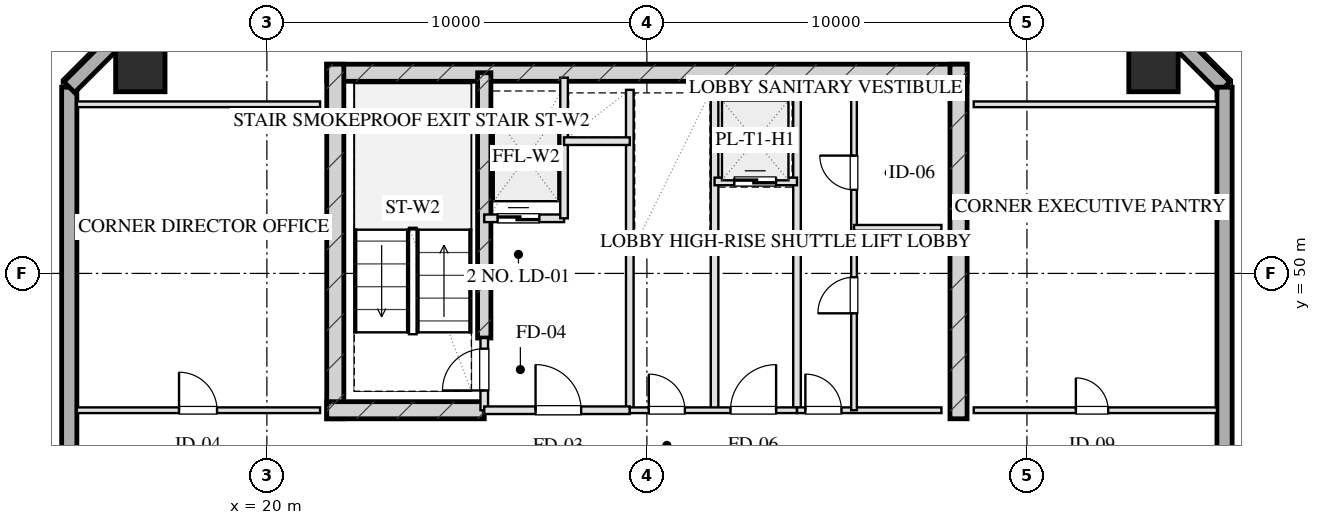
"""IFC4 building model, lengths in metres.
Left out: names, types, materials, properties, quantities, classifications, styles, units other than length and angle.
Written with IfcOpenShell. Run it as: python <this file> out.ifc"""

import sys

from ifc_helpers import new_model, si_unit, direction, frame, frame_2d, origin, origin_2d, place, context, subcontext, project, spatial, rectangle, hollow_rectangle, extrude, element, fill, save


model = new_model("IFC4")
c1 = context("Model", 3, precision=1e-05, world=origin(), true_north=direction((0.0, 1.0)))
c2 = subcontext(c1, "Body", "Model", "MODEL_VIEW")
j1 = project(units=[si_unit("LENGTHUNIT", "METRE"), si_unit("PLANEANGLEUNIT", "RADIAN")], contexts=[c1])
p1 = place(None, origin())
s1 = spatial("IfcSite", under=j1, at=p1, CompositionType="ELEMENT")
p2 = place(p1, origin())
s2 = spatial("IfcBuilding", under=s1, at=p2, CompositionType="ELEMENT")
p3 = place(p2, frame((0.0, 0.0, 226.55)))
s3 = spatial("IfcBuildingStorey", under=s2, at=p3, CompositionType="ELEMENT", Elevation=226.55)
p4 = place(p3, frame((21.575, 55.28, 0.0), z_axis=(0.0, 0.0, 1.0), x_axis=(1.0, 0.0, 0.0)))
e1 = element("IfcWall", 1, at=p4, inside=s3, PredefinedType="SHEAR", context=c2, shape_type="SweptSolid", body=[
    extrude(rectangle(XDim=16.85, YDim=0.45, at=frame_2d((8.425, 0.0))), origin(), (0.0, 0.0, 1.0), 3.45),
])
for number, where, z_axis, x_axis in (
    (2, (21.8, 46.175, 0.0), (0.0, 0.0, 1.0), (0.0, 1.0, 0.0)),
    (3, (38.2, 46.175, 0.0), (0.0, 0.0, 1.0), (0.0, 1.0, 0.0)),
):
    element("IfcWall", number, at=place(p3, frame(where, z_axis=z_axis, x_axis=x_axis)), inside=s3, PredefinedType="SHEAR", context=c2, shape_type="SweptSolid", body=[
        extrude(rectangle(XDim=9.33, YDim=0.45, at=frame_2d((4.665, 0.0))), origin(), (0.0, 0.0, 1.0), 3.45),
    ])
p5 = place(p3, frame((25.72, 48.3, 0.0), z_axis=(0.0, 0.0, 1.0), x_axis=(0.0, 1.0, 0.0)))
e4 = element("IfcWall", 4, at=p5, inside=s3, PredefinedType="SHEAR", context=c2, shape_type="SweptSolid", body=[
    extrude(rectangle(XDim=6.98, YDim=0.35, at=frame_2d((3.49, 0.0))), origin(), (0.0, 0.0, 1.0), 3.45),
])
p6 = place(p3, frame((21.575, 46.4, 0.0), z_axis=(0.0, 0.0, 1.0), x_axis=(1.0, 0.0, 0.0)))
e5 = element("IfcWall", 5, at=p6, inside=s3, PredefinedType="SHEAR", context=c2, shape_type="SweptSolid", body=[
    extrude(rectangle(XDim=4.145, YDim=0.45, at=frame_2d((2.073, 0.0))), origin(), (0.0, 0.0, 1.0), 3.45),
])
for number, where, z_axis, x_axis in (
    (6, (43.33, 55.43, 0.0), (0.0, 0.0, 1.0), (1.0, 0.0, 0.0)),
    (7, (16.67, 55.43, 0.0), (0.0, 0.0, 1.0), (1.0, 0.0, 0.0)),
):
    element("IfcColumn", number, at=place(p3, frame(where, z_axis=z_axis, x_axis=x_axis)), inside=s3, PredefinedType="COLUMN", context=c2, shape_type="SweptSolid", body=[
        extrude(hollow_rectangle(XDim=1.3, YDim=1.3, WallThickness=0.045, at=origin_2d()), origin(), (0.0, 0.0, 1.0), 3.451),
    ])
p7 = place(p3, frame((14.8, 13.1, 0.0), z_axis=(0.0, 0.0, 1.0), x_axis=(0.0, 1.0, 0.0)))
e8 = element("IfcWall", 8, at=p7, inside=s3, PredefinedType="SOLIDWALL", context=c2, shape_type="SweptSolid", body=[
    extrude(rectangle(XDim=41.8, YDim=0.4, at=frame_2d((20.9, 0.0))), origin(), (0.0, 0.0, 1.0), 2.55),
])
p8 = place(p7, frame((13.525, 0.0, 0.75)))
e9 = element("IfcOpeningElement", 9, at=p8, cuts=e8, PredefinedType="OPENING", context=c2, shape_type="SweptSolid", body=[
    extrude(rectangle(XDim=1.95, YDim=1.4, at=frame_2d((0.975, 0.7))), frame((0.0, 0.21, 0.0), z_axis=(0.0, -1.0, 0.0), x_axis=(1.0, 0.0, 0.0)), (0.0, 0.0, 1.0), 0.42),
])
p9 = place(p7, frame((17.325, 0.0, 0.75)))
e10 = element("IfcOpeningElement", 10, at=p9, cuts=e8, PredefinedType="OPENING", context=c2, shape_type="SweptSolid", body=[
    extrude(rectangle(XDim=1.95, YDim=1.4, at=frame_2d((0.975, 0.7))), frame((0.0, 0.21, 0.0), z_axis=(0.0, -1.0, 0.0), x_axis=(1.0, 0.0, 0.0)), (0.0, 0.0, 1.0), 0.42),
])
p10 = place(p7, frame((23.2, 0.0, 0.0)))
e11 = element("IfcOpeningElement", 11, at=p10, cuts=e8, PredefinedType="OPENING", context=c2, shape_type="SweptSolid", body=[
    extrude(rectangle(XDim=1.1, YDim=2.15, at=frame_2d((0.55, 1.075))), frame((0.0, 0.21, 0.0), z_axis=(0.0, -1.0, 0.0), x_axis=(1.0, 0.0, 0.0)), (0.0, 0.0, 1.0), 0.42),
])
for number, where, z_axis, x_axis in (
    (12, (14.8, 54.9, 0.0), (0.0, 0.0, 1.0), (0.707, 0.707, 0.0)),
    (13, (42.8, 57.3, 0.0), (0.0, 0.0, 1.0), (0.707, -0.707, 0.0)),
):
    element("IfcWall", number, at=place(p3, frame(where, z_axis=z_axis, x_axis=x_axis)), inside=s3, PredefinedType="SOLIDWALL", context=c2, shape_type="SweptSolid", body=[
        extrude(rectangle(XDim=3.394, YDim=0.4, at=frame_2d((1.697, 0.0))), origin(), (0.0, 0.0, 1.0), 2.55),
    ])
p11 = place(p3, frame((45.2, 54.9, 0.0), z_axis=(0.0, 0.0, 1.0), x_axis=(0.0, -1.0, 0.0)))
e14 = element("IfcWall", 14, at=p11, inside=s3, PredefinedType="SOLIDWALL", context=c2, shape_type="SweptSolid", body=[
    extrude(rectangle(XDim=41.8, YDim=0.4, at=frame_2d((20.9, 0.0))), origin(), (0.0, 0.0, 1.0), 2.55),
])
p12 = place(p11, frame((26.325, 0.0, 0.75)))
e15 = element("IfcOpeningElement", 15, at=p12, cuts=e14, PredefinedType="OPENING", context=c2, shape_type="SweptSolid", body=[
    extrude(rectangle(XDim=1.95, YDim=1.4, at=frame_2d((0.975, 0.7))), frame((0.0, 0.21, 0.0), z_axis=(0.0, -1.0, 0.0), x_axis=(1.0, 0.0, 0.0)), (0.0, 0.0, 1.0), 0.42),
])
p13 = place(p11, frame((22.525, 0.0, 0.75)))
e16 = element("IfcOpeningElement", 16, at=p13, cuts=e14, PredefinedType="OPENING", context=c2, shape_type="SweptSolid", body=[
    extrude(rectangle(XDim=1.95, YDim=1.4, at=frame_2d((0.975, 0.7))), frame((0.0, 0.21, 0.0), z_axis=(0.0, -1.0, 0.0), x_axis=(1.0, 0.0, 0.0)), (0.0, 0.0, 1.0), 0.42),
])
p14 = place(p11, frame((17.5, 0.0, 0.0)))
e17 = element("IfcOpeningElement", 17, at=p14, cuts=e14, PredefinedType="OPENING", context=c2, shape_type="SweptSolid", body=[
    extrude(rectangle(XDim=1.1, YDim=2.15, at=frame_2d((0.55, 1.075))), frame((0.0, 0.21, 0.0), z_axis=(0.0, -1.0, 0.0), x_axis=(1.0, 0.0, 0.0)), (0.0, 0.0, 1.0), 0.42),
])
p15 = place(p3, frame((25.72, 46.4, 0.0), z_axis=(0.0, 0.0, 1.0), x_axis=(0.0, 1.0, 0.0)))
e18 = element("IfcWall", 18, at=p15, inside=s3, PredefinedType="PARTITIONING", context=c2, shape_type="SweptSolid", body=[
    extrude(rectangle(XDim=1.9, YDim=0.2, at=frame_2d((0.95, 0.0))), origin(), (0.0, 0.0, 1.0), 3.155),
])
p16 = place(p15, frame((0.52, 0.0, 0.0)))
e19 = element("IfcOpeningElement", 19, at=p16, cuts=e18, PredefinedType="OPENING", context=c2, shape_type="SweptSolid", body=[
    extrude(rectangle(XDim=1.1, YDim=2.05, at=frame_2d((0.55, 1.025))), frame((0.0, 0.11, 0.0), z_axis=(0.0, -1.0, 0.0), x_axis=(1.0, 0.0, 0.0)), (0.0, 0.0, 1.0), 0.22),
])
p17 = place(p3, frame((29.55, 46.4, 0.0), z_axis=(0.0, 0.0, 1.0), x_axis=(0.0, 1.0, 0.0)))
e20 = element("IfcWall", 20, at=p17, inside=s3, PredefinedType="PARTITIONING", context=c2, shape_type="SweptSolid", body=[
    extrude(rectangle(XDim=8.43, YDim=0.2, at=frame_2d((4.215, 0.0))), origin(), (0.0, 0.0, 1.0), 3.155),
])
p18 = place(p3, frame((25.72, 46.4, 0.0), z_axis=(0.0, 0.0, 1.0), x_axis=(1.0, 0.0, 0.0)))
e21 = element("IfcWall", 21, at=p18, inside=s3, PredefinedType="PARTITIONING", context=c2, shape_type="SweptSolid", body=[
    extrude(rectangle(XDim=3.83, YDim=0.2, at=frame_2d((1.915, 0.0))), origin(), (0.0, 0.0, 1.0), 3.155),
])
p19 = place(p18, frame((1.35, 0.0, 0.0)))
e22 = element("IfcOpeningElement", 22, at=p19, cuts=e21, PredefinedType="OPENING", context=c2, shape_type="SweptSolid", body=[
    extrude(rectangle(XDim=1.2, YDim=2.05, at=frame_2d((0.6, 1.025))), frame((0.0, 0.11, 0.0), z_axis=(0.0, -1.0, 0.0), x_axis=(1.0, 0.0, 0.0)), (0.0, 0.0, 1.0), 0.22),
])
p20 = place(p3, frame((25.72, 51.45, 0.0), z_axis=(0.0, 0.0, 1.0), x_axis=(1.0, 0.0, 0.0)))
e23 = element("IfcWall", 23, at=p20, inside=s3, PredefinedType="PARTITIONING", context=c2, shape_type="SweptSolid", body=[
    extrude(rectangle(XDim=2.1, YDim=0.2, at=frame_2d((1.05, 0.0))), origin(), (0.0, 0.0, 1.0), 3.155),
])
p21 = place(p20, frame((0.35, 0.0, 0.0)))
e24 = element("IfcOpeningElement", 24, at=p21, cuts=e23, PredefinedType="OPENING", context=c2, shape_type="SweptSolid", body=[
    extrude(rectangle(XDim=1.1, YDim=2.05, at=frame_2d((0.55, 1.025))), frame((0.0, 0.11, 0.0), z_axis=(0.0, -1.0, 0.0), x_axis=(1.0, 0.0, 0.0)), (0.0, 0.0, 1.0), 0.22),
])
p22 = place(p3, frame((27.82, 51.45, 0.0), z_axis=(0.0, 0.0, 1.0), x_axis=(0.0, 1.0, 0.0)))
e25 = element("IfcWall", 25, at=p22, inside=s3, PredefinedType="PARTITIONING", context=c2, shape_type="SweptSolid", body=[
    extrude(rectangle(XDim=3.7, YDim=0.2, at=frame_2d((1.85, 0.0))), origin(), (0.0, 0.0, 1.0), 3.155),
])
p23 = place(p3, frame((27.82, 53.48, 0.0), z_axis=(0.0, 0.0, 1.0), x_axis=(1.0, 0.0, 0.0)))
e26 = element("IfcWall", 26, at=p23, inside=s3, PredefinedType="PARTITIONING", context=c2, shape_type="SweptSolid", body=[
    extrude(rectangle(XDim=1.73, YDim=0.2, at=frame_2d((0.865, 0.0))), origin(), (0.0, 0.0, 1.0), 3.155),
])
for number, where, z_axis, x_axis in (
    (27, (33.95, 46.4, 0.0), (0.0, 0.0, 1.0), (0.0, 1.0, 0.0)),
    (28, (31.78, 46.4, 0.0), (0.0, 0.0, 1.0), (0.0, 1.0, 0.0)),
):
    element("IfcWall", number, at=place(p3, frame(where, z_axis=z_axis, x_axis=x_axis)), inside=s3, PredefinedType="PARTITIONING", context=c2, shape_type="SweptSolid", body=[
        extrude(rectangle(XDim=8.43, YDim=0.2, at=frame_2d((4.215, 0.0))), origin(), (0.0, 0.0, 1.0), 3.155),
    ])
p24 = place(p3, frame((29.55, 46.4, 0.0), z_axis=(0.0, 0.0, 1.0), x_axis=(1.0, 0.0, 0.0)))
e29 = element("IfcWall", 29, at=p24, inside=s3, PredefinedType="PARTITIONING", context=c2, shape_type="SweptSolid", body=[
    extrude(rectangle(XDim=4.4, YDim=0.15, at=frame_2d((2.2, 0.0))), origin(), (0.0, 0.0, 1.0), 3.155),
])
p25 = place(p24, frame((0.5, 0.0, 0.0)))
e30 = element("IfcOpeningElement", 30, at=p25, cuts=e29, PredefinedType="OPENING", context=c2, shape_type="SweptSolid", body=[
    extrude(rectangle(XDim=0.95, YDim=2.05, at=frame_2d((0.475, 1.025))), frame((0.0, 0.085, 0.0), z_axis=(0.0, -1.0, 0.0), x_axis=(1.0, 0.0, 0.0)), (0.0, 0.0, 1.0), 0.17),
])
p26 = place(p24, frame((2.65, 0.0, 0.0)))
e31 = element("IfcOpeningElement", 31, at=p26, cuts=e29, PredefinedType="OPENING", context=c2, shape_type="SweptSolid", body=[
    extrude(rectangle(XDim=1.2, YDim=2.05, at=frame_2d((0.6, 1.025))), frame((0.0, 0.085, 0.0), z_axis=(0.0, -1.0, 0.0), x_axis=(1.0, 0.0, 0.0)), (0.0, 0.0, 1.0), 0.17),
])
p27 = place(p3, frame((29.55, 50.6, 0.0), z_axis=(0.0, 0.0, 1.0), x_axis=(1.0, 0.0, 0.0)))
e32 = element("IfcWall", 32, at=p27, inside=s3, PredefinedType="PARTITIONING", context=c2, shape_type="SweptSolid", body=[
    extrude(rectangle(XDim=2.23, YDim=0.15, at=frame_2d((1.115, 0.0))), origin(), (0.0, 0.0, 1.0), 3.155),
])
p28 = place(p3, frame((31.78, 52.42, 0.0), z_axis=(0.0, 0.0, 1.0), x_axis=(1.0, 0.0, 0.0)))
e33 = element("IfcWall", 33, at=p28, inside=s3, PredefinedType="PARTITIONING", context=c2, shape_type="SweptSolid", body=[
    extrude(rectangle(XDim=2.17, YDim=0.2, at=frame_2d((1.085, 0.0))), origin(), (0.0, 0.0, 1.0), 3.155),
])
p29 = place(p28, frame((0.52, 0.0, 0.0)))
e34 = element("IfcOpeningElement", 34, at=p29, cuts=e33, PredefinedType="OPENING", context=c2, shape_type="SweptSolid", body=[
    extrude(rectangle(XDim=1.1, YDim=2.05, at=frame_2d((0.55, 1.025))), frame((0.0, 0.11, 0.0), z_axis=(0.0, -1.0, 0.0), x_axis=(1.0, 0.0, 0.0)), (0.0, 0.0, 1.0), 0.22),
])
p30 = place(p3, frame((33.95, 46.4, 0.0), z_axis=(0.0, 0.0, 1.0), x_axis=(1.0, 0.0, 0.0)))
e35 = element("IfcWall", 35, at=p30, inside=s3, PredefinedType="PARTITIONING", context=c2, shape_type="SweptSolid", body=[
    extrude(rectangle(XDim=3.8, YDim=0.15, at=frame_2d((1.9, 0.0))), origin(), (0.0, 0.0, 1.0), 3.155),
])
p31 = place(p30, frame((0.22, 0.0, 0.0)))
e36 = element("IfcOpeningElement", 36, at=p31, cuts=e35, PredefinedType="OPENING", context=c2, shape_type="SweptSolid", body=[
    extrude(rectangle(XDim=0.95, YDim=2.05, at=frame_2d((0.475, 1.025))), frame((0.0, 0.085, 0.0), z_axis=(0.0, -1.0, 0.0), x_axis=(1.0, 0.0, 0.0)), (0.0, 0.0, 1.0), 0.17),
])
p32 = place(p3, frame((35.45, 46.4, 0.0), z_axis=(0.0, 0.0, 1.0), x_axis=(0.0, 1.0, 0.0)))
e37 = element("IfcWall", 37, at=p32, inside=s3, PredefinedType="PARTITIONING", context=c2, shape_type="SweptSolid", body=[
    extrude(rectangle(XDim=8.43, YDim=0.15, at=frame_2d((4.215, 0.0))), origin(), (0.0, 0.0, 1.0), 2.795),
])
p33 = place(p32, frame((2.55, 0.0, 0.0)))
e38 = element("IfcOpeningElement", 38, at=p33, cuts=e37, PredefinedType="OPENING", context=c2, shape_type="SweptSolid", body=[
    extrude(rectangle(XDim=0.95, YDim=2.05, at=frame_2d((0.475, 1.025))), frame((0.0, 0.085, 0.0), z_axis=(0.0, -1.0, 0.0), x_axis=(1.0, 0.0, 0.0)), (0.0, 0.0, 1.0), 0.17),
])
p34 = place(p32, frame((5.8, 0.0, 0.0)))
e39 = element("IfcOpeningElement", 39, at=p34, cuts=e37, PredefinedType="OPENING", context=c2, shape_type="SweptSolid", body=[
    extrude(rectangle(XDim=0.9, YDim=2.05, at=frame_2d((0.45, 1.025))), frame((0.0, 0.085, 0.0), z_axis=(0.0, -1.0, 0.0), x_axis=(1.0, 0.0, 0.0)), (0.0, 0.0, 1.0), 0.17),
])
p35 = place(p3, frame((35.45, 51.2, 0.0), z_axis=(0.0, 0.0, 1.0), x_axis=(1.0, 0.0, 0.0)))
e40 = element("IfcWall", 40, at=p35, inside=s3, PredefinedType="PARTITIONING", context=c2, shape_type="SweptSolid", body=[
    extrude(rectangle(XDim=2.3, YDim=0.15, at=frame_2d((1.15, 0.0))), origin(), (0.0, 0.0, 1.0), 3.155),
])
p36 = place(p3, frame((15.0, 54.45, 0.0), z_axis=(0.0, 0.0, 1.0), x_axis=(1.0, 0.0, 0.0)))
e41 = element("IfcWall", 41, at=p36, inside=s3, PredefinedType="PARTITIONING", context=c2, shape_type="SweptSolid", body=[
    extrude(rectangle(XDim=6.4, YDim=0.15, at=frame_2d((3.2, 0.0))), origin(), (0.0, 0.0, 1.0), 3.155),
])
p37 = place(p3, frame((15.0, 46.4, 0.0), z_axis=(0.0, 0.0, 1.0), x_axis=(1.0, 0.0, 0.0)))
e42 = element("IfcWall", 42, at=p37, inside=s3, PredefinedType="PARTITIONING", context=c2, shape_type="SweptSolid", body=[
    extrude(rectangle(XDim=6.4, YDim=0.15, at=frame_2d((3.2, 0.0))), origin(), (0.0, 0.0, 1.0), 3.155),
])
p38 = place(p37, frame((2.688, 0.0, 0.0)))
e43 = element("IfcOpeningElement", 43, at=p38, cuts=e42, PredefinedType="OPENING", context=c2, shape_type="SweptSolid", body=[
    extrude(rectangle(XDim=1.0, YDim=2.05, at=frame_2d((0.5, 1.025))), frame((0.0, 0.085, 0.0), z_axis=(0.0, -1.0, 0.0), x_axis=(1.0, 0.0, 0.0)), (0.0, 0.0, 1.0), 0.17),
])
p39 = place(p3, frame((38.6, 54.45, 0.0), z_axis=(0.0, 0.0, 1.0), x_axis=(1.0, 0.0, 0.0)))
e44 = element("IfcWall", 44, at=p39, inside=s3, PredefinedType="PARTITIONING", context=c2, shape_type="SweptSolid", body=[
    extrude(rectangle(XDim=6.4, YDim=0.15, at=frame_2d((3.2, 0.0))), origin(), (0.0, 0.0, 1.0), 3.155),
])
p40 = place(p3, frame((38.6, 46.4, 0.0), z_axis=(0.0, 0.0, 1.0), x_axis=(1.0, 0.0, 0.0)))
e45 = element("IfcWall", 45, at=p40, inside=s3, PredefinedType="PARTITIONING", context=c2, shape_type="SweptSolid", body=[
    extrude(rectangle(XDim=6.4, YDim=0.15, at=frame_2d((3.2, 0.0))), origin(), (0.0, 0.0, 1.0), 3.155),
])
p41 = place(p40, frame((2.688, 0.0, 0.0)))
e46 = element("IfcOpeningElement", 46, at=p41, cuts=e45, PredefinedType="OPENING", context=c2, shape_type="SweptSolid", body=[
    extrude(rectangle(XDim=0.85, YDim=2.05, at=frame_2d((0.425, 1.025))), frame((0.0, 0.085, 0.0), z_axis=(0.0, -1.0, 0.0), x_axis=(1.0, 0.0, 0.0)), (0.0, 0.0, 1.0), 0.17),
])
p42 = place(p16, origin())
e47 = element("IfcDoor", 47, at=p42, inside=s3, OperationType="SINGLE_SWING_LEFT", PredefinedType="DOOR", context=c2, shape_type="SweptSolid", body=[
    extrude(rectangle(XDim=1.1, YDim=2.05, at=frame_2d((0.55, 1.025))), frame((0.0, 0.025, 0.0), z_axis=(0.0, -1.0, 0.0), x_axis=(1.0, 0.0, 0.0)), (0.0, 0.0, 1.0), 0.05),
])
fill(e19, e47)
p43 = place(p19, origin())
e48 = element("IfcDoor", 48, at=p43, inside=s3, OperationType="SINGLE_SWING_LEFT", PredefinedType="DOOR", context=c2, shape_type="SweptSolid", body=[
    extrude(rectangle(XDim=1.2, YDim=2.05, at=frame_2d((0.6, 1.025))), frame((0.0, 0.025, 0.0), z_axis=(0.0, -1.0, 0.0), x_axis=(1.0, 0.0, 0.0)), (0.0, 0.0, 1.0), 0.05),
])
fill(e22, e48)
p44 = place(p21, origin())
e49 = element("IfcDoor", 49, at=p44, inside=s3, OperationType="DOUBLE_DOOR_SLIDING", PredefinedType="DOOR", context=c2, shape_type="SweptSolid", body=[
    extrude(rectangle(XDim=1.1, YDim=2.05, at=frame_2d((0.55, 1.025))), frame((0.0, 0.025, 0.0), z_axis=(0.0, -1.0, 0.0), x_axis=(1.0, 0.0, 0.0)), (0.0, 0.0, 1.0), 0.05),
])
fill(e24, e49)
p45 = place(p25, origin())
e50 = element("IfcDoor", 50, at=p45, inside=s3, OperationType="SINGLE_SWING_LEFT", PredefinedType="DOOR", context=c2, shape_type="SweptSolid", body=[
    extrude(rectangle(XDim=0.95, YDim=2.05, at=frame_2d((0.475, 1.025))), frame((0.0, 0.025, 0.0), z_axis=(0.0, -1.0, 0.0), x_axis=(1.0, 0.0, 0.0)), (0.0, 0.0, 1.0), 0.05),
])
fill(e30, e50)
p46 = place(p26, origin())
e51 = element("IfcDoor", 51, at=p46, inside=s3, OperationType="SINGLE_SWING_RIGHT", PredefinedType="DOOR", context=c2, shape_type="SweptSolid", body=[
    extrude(rectangle(XDim=1.2, YDim=2.05, at=frame_2d((0.6, 1.025))), frame((0.0, 0.025, 0.0), z_axis=(0.0, -1.0, 0.0), x_axis=(1.0, 0.0, 0.0)), (0.0, 0.0, 1.0), 0.05),
])
fill(e31, e51)
p47 = place(p29, origin())
e52 = element("IfcDoor", 52, at=p47, inside=s3, OperationType="DOUBLE_DOOR_SLIDING", PredefinedType="DOOR", context=c2, shape_type="SweptSolid", body=[
    extrude(rectangle(XDim=1.1, YDim=2.05, at=frame_2d((0.55, 1.025))), frame((0.0, 0.025, 0.0), z_axis=(0.0, -1.0, 0.0), x_axis=(1.0, 0.0, 0.0)), (0.0, 0.0, 1.0), 0.05),
])
fill(e34, e52)
p48 = place(p31, origin())
e53 = element("IfcDoor", 53, at=p48, inside=s3, OperationType="SINGLE_SWING_LEFT", PredefinedType="DOOR", context=c2, shape_type="SweptSolid", body=[
    extrude(rectangle(XDim=0.95, YDim=2.05, at=frame_2d((0.475, 1.025))), frame((0.0, 0.025, 0.0), z_axis=(0.0, -1.0, 0.0), x_axis=(1.0, 0.0, 0.0)), (0.0, 0.0, 1.0), 0.05),
])
fill(e36, e53)
p49 = place(p33, origin())
e54 = element("IfcDoor", 54, at=p49, inside=s3, OperationType="SINGLE_SWING_LEFT", PredefinedType="DOOR", context=c2, shape_type="SweptSolid", body=[
    extrude(rectangle(XDim=0.95, YDim=2.05, at=frame_2d((0.475, 1.025))), frame((0.0, 0.025, 0.0), z_axis=(0.0, -1.0, 0.0), x_axis=(1.0, 0.0, 0.0)), (0.0, 0.0, 1.0), 0.05),
])
fill(e38, e54)
p50 = place(p34, origin())
e55 = element("IfcDoor", 55, at=p50, inside=s3, OperationType="SINGLE_SWING_RIGHT", PredefinedType="DOOR", context=c2, shape_type="SweptSolid", body=[
    extrude(rectangle(XDim=0.9, YDim=2.05, at=frame_2d((0.45, 1.025))), frame((0.0, 0.025, 0.0), z_axis=(0.0, -1.0, 0.0), x_axis=(1.0, 0.0, 0.0)), (0.0, 0.0, 1.0), 0.05),
])
fill(e39, e55)
p51 = place(p38, origin())
e56 = element("IfcDoor", 56, at=p51, inside=s3, OperationType="SINGLE_SWING_LEFT", PredefinedType="DOOR", context=c2, shape_type="SweptSolid", body=[
    extrude(rectangle(XDim=1.0, YDim=2.05, at=frame_2d((0.5, 1.025))), frame((0.0, 0.025, 0.0), z_axis=(0.0, -1.0, 0.0), x_axis=(1.0, 0.0, 0.0)), (0.0, 0.0, 1.0), 0.05),
])
fill(e43, e56)
p52 = place(p41, origin())
e57 = element("IfcDoor", 57, at=p52, inside=s3, OperationType="SINGLE_SWING_LEFT", PredefinedType="DOOR", context=c2, shape_type="SweptSolid", body=[
    extrude(rectangle(XDim=0.85, YDim=2.05, at=frame_2d((0.425, 1.025))), frame((0.0, 0.025, 0.0), z_axis=(0.0, -1.0, 0.0), x_axis=(1.0, 0.0, 0.0)), (0.0, 0.0, 1.0), 0.05),
])
fill(e46, e57)
save(model, sys.argv[1])
